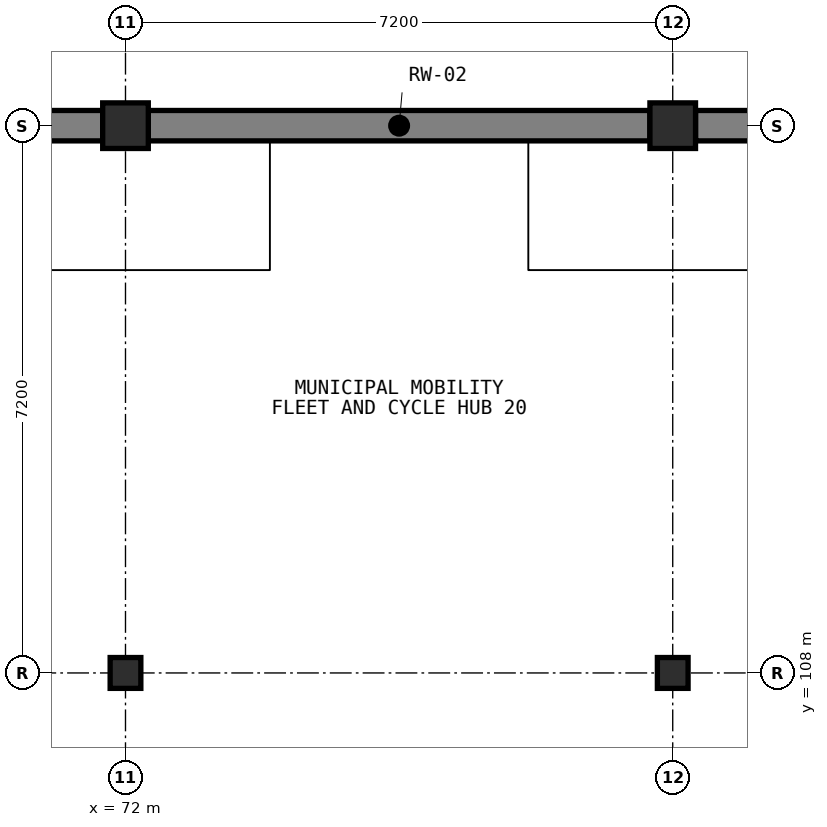
"""IFC4 building model, lengths in metres.
Left out: names, types, materials, properties, quantities, classifications, styles, units other than length and angle.
Written with IfcOpenShell. Run it as: python <this file> out.ifc"""

import sys

from ifc_helpers import new_model, si_unit, direction, frame, frame_2d, origin, origin_2d, place, context, subcontext, project, spatial, rectangle, i_section, extrude, element, save


model = new_model("IFC4")
c1 = context("Model", 3, precision=1e-05, world=origin(), true_north=direction((0.0, 1.0)))
c2 = subcontext(c1, "Body", "Model", "MODEL_VIEW")
j1 = project(units=[si_unit("LENGTHUNIT", "METRE"), si_unit("PLANEANGLEUNIT", "RADIAN")], contexts=[c1])
p1 = place(None, origin())
s1 = spatial("IfcSite", under=j1, at=p1, CompositionType="ELEMENT")
p2 = place(p1, origin())
s2 = spatial("IfcBuilding", under=s1, at=p2, CompositionType="ELEMENT")
p3 = place(p2, frame((0.0, 0.0, -4.2)))
s3 = spatial("IfcBuildingStorey", under=s2, at=p3, CompositionType="ELEMENT", Elevation=-4.2)
for number, where, z_axis, x_axis in (
    (1, (65.1, 115.2, 0.0), (0.0, 0.0, 1.0), (1.0, 0.0, 0.0)),
    (2, (72.3, 115.2, 0.0), (0.0, 0.0, 1.0), (1.0, 0.0, 0.0)),
):
    element("IfcWall", number, at=place(p3, frame(where, z_axis=z_axis, x_axis=x_axis)), inside=s3, PredefinedType="USERDEFINED", context=c2, shape_type="SweptSolid", body=[
        extrude(rectangle(XDim=6.6, YDim=0.4, at=frame_2d((3.3, 0.0))), origin(), (0.0, 0.0, 1.0), 3.98),
    ])
p4 = place(p3, frame((79.5, 115.2, 0.0), z_axis=(0.0, 0.0, 1.0), x_axis=(1.0, 0.0, 0.0)))
e3 = element("IfcWall", 3, at=p4, inside=s3, PredefinedType="USERDEFINED", context=c2, shape_type="SweptSolid", body=[
    extrude(rectangle(XDim=6.6, YDim=0.4, at=frame_2d((3.3, 0.0))), origin(), (0.0, 0.0, 1.0), 3.98),
])
p5 = place(p3, frame((72.0, 108.0, 0.0), z_axis=(0.0, 0.0, 1.0), x_axis=(1.0, 0.0, 0.0)))
e4 = element("IfcColumn", 4, at=p5, inside=s3, PredefinedType="COLUMN", context=c2, shape_type="SweptSolid", body=[
    extrude(i_section(OverallWidth=0.404, OverallDepth=0.406, WebThickness=0.027, FlangeThickness=0.044, FilletRadius=0.015, at=origin_2d()), origin(), (0.0, 0.0, 1.0), 4.2),
])
p6 = place(p3, frame((72.0, 115.2, 0.0), z_axis=(0.0, 0.0, 1.0), x_axis=(1.0, 0.0, 0.0)))
e5 = element("IfcColumn", 5, at=p6, inside=s3, PredefinedType="COLUMN", context=c2, shape_type="SweptSolid", body=[
    extrude(rectangle(XDim=0.6, YDim=0.6, at=origin_2d()), origin(), (0.0, 0.0, 1.0), 4.2),
])
p7 = place(p3, frame((79.2, 108.0, 0.0), z_axis=(0.0, 0.0, 1.0), x_axis=(1.0, 0.0, 0.0)))
e6 = element("IfcColumn", 6, at=p7, inside=s3, PredefinedType="COLUMN", context=c2, shape_type="SweptSolid", body=[
    extrude(i_section(OverallWidth=0.404, OverallDepth=0.406, WebThickness=0.027, FlangeThickness=0.044, FilletRadius=0.015, at=origin_2d()), origin(), (0.0, 0.0, 1.0), 4.2),
])
p8 = place(p3, frame((79.2, 115.2, 0.0), z_axis=(0.0, 0.0, 1.0), x_axis=(1.0, 0.0, 0.0)))
e7 = element("IfcColumn", 7, at=p8, inside=s3, PredefinedType="COLUMN", context=c2, shape_type="SweptSolid", body=[
    extrude(rectangle(XDim=0.6, YDim=0.6, at=origin_2d()), origin(), (0.0, 0.0, 1.0), 4.2),
])
save(model, sys.argv[1])
